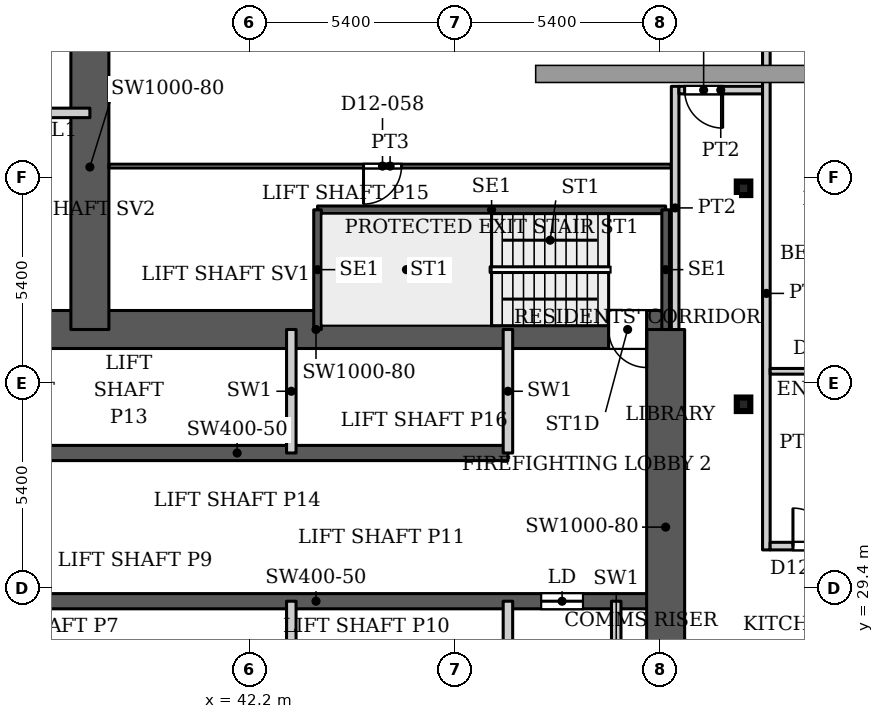
"""IFC4 building model, lengths in metres.
Left out: names, types, materials, properties, quantities, classifications, styles, units other than length and angle.
Written with IfcOpenShell. Run it as: python <this file> out.ifc"""

import sys

from ifc_helpers import new_model, si_unit, direction, frame, frame_2d, origin, origin_2d, place, context, subcontext, project, spatial, rectangle, hollow_rectangle, extrude, source, transform, mapped, element, fill, save


model = new_model("IFC4")
c1 = context("Model", 3, precision=1e-05, world=origin(), true_north=direction((0.0, 1.0)))
c2 = subcontext(c1, "Body", "Model", "MODEL_VIEW")
j1 = project(units=[si_unit("LENGTHUNIT", "METRE"), si_unit("PLANEANGLEUNIT", "RADIAN")], contexts=[c1])
p1 = place(None, origin())
s1 = spatial("IfcSite", under=j1, at=p1, CompositionType="ELEMENT")
p2 = place(p1, origin())
s2 = spatial("IfcBuilding", under=s1, at=p2, CompositionType="ELEMENT")
p3 = place(p2, frame((0.0, 0.0, 57.8)))
s3 = spatial("IfcBuildingStorey", under=s2, at=p3, CompositionType="ELEMENT", Elevation=57.8)
for number, where, z_axis, x_axis in (
    (1, (55.2, 34.232, 0.0), (0.0, 0.0, 1.0), (1.0, 0.0, 0.0)),
    (2, (55.2, 39.916, 0.0), (0.0, 0.0, 1.0), (1.0, 0.0, 0.0)),
):
    element("IfcColumn", number, at=place(p3, frame(where, z_axis=z_axis, x_axis=x_axis)), inside=s3, PredefinedType="COLUMN", context=c2, shape_type="SweptSolid", body=[
        extrude(hollow_rectangle(XDim=0.356, YDim=0.356, WallThickness=0.016, InnerFilletRadius=0.016, OuterFilletRadius=0.032, at=origin_2d()), origin(), (0.0, 0.0, 1.0), 3.9),
    ])
p4 = place(p3, frame((34.75, 29.05, 0.0), z_axis=(0.0, 0.0, 1.0), x_axis=(1.0, 0.0, 0.0)))
e3 = element("IfcWall", 3, at=p4, inside=s3, PredefinedType="SHEAR", context=c2, shape_type="SweptSolid", body=[
    extrude(rectangle(XDim=18.4, YDim=0.4, at=frame_2d((9.2, 0.0))), origin(), (0.0, 0.0, 1.0), 3.9),
])
p5 = place(p4, frame((15.125, 0.0, 0.0)))
e4 = element("IfcOpeningElement", 4, at=p5, cuts=e3, PredefinedType="OPENING", context=c2, shape_type="SweptSolid", body=[
    extrude(rectangle(XDim=1.1, YDim=2.2, at=frame_2d((0.55, 1.1))), frame((0.0, 0.21, 0.0), z_axis=(0.0, -1.0, 0.0), x_axis=(1.0, 0.0, 0.0)), (0.0, 0.0, 1.0), 0.42),
])
p6 = place(p3, frame((34.75, 32.95, 0.0), z_axis=(0.0, 0.0, 1.0), x_axis=(1.0, 0.0, 0.0)))
e5 = element("IfcWall", 5, at=p6, inside=s3, PredefinedType="SHEAR", context=c2, shape_type="SweptSolid", body=[
    extrude(rectangle(XDim=14.25, YDim=0.4, at=frame_2d((7.125, 0.0))), origin(), (0.0, 0.0, 1.0), 3.9),
])
p7 = place(p3, frame((34.75, 36.2, 0.0), z_axis=(0.0, 0.0, 1.0), x_axis=(1.0, 0.0, 0.0)))
e6 = element("IfcWall", 6, at=p7, inside=s3, PredefinedType="SHEAR", context=c2, shape_type="SweptSolid", body=[
    extrude(rectangle(XDim=18.4, YDim=1.0, at=frame_2d((9.2, 0.0))), origin(), (0.0, 0.0, 1.0), 3.9),
])
p8 = place(p7, frame((16.9, 0.0, 0.0)))
e7 = element("IfcOpeningElement", 7, at=p8, cuts=e6, PredefinedType="OPENING", context=c2, shape_type="SweptSolid", body=[
    extrude(rectangle(XDim=1.0, YDim=2.2, at=frame_2d((0.5, 1.1))), frame((0.0, 0.51, 0.0), z_axis=(0.0, -1.0, 0.0), x_axis=(1.0, 0.0, 0.0)), (0.0, 0.0, 1.0), 1.02),
])
p9 = place(p3, frame((38.0, 36.2, 0.0), z_axis=(0.0, 0.0, 1.0), x_axis=(0.0, 1.0, 0.0)))
e8 = element("IfcWall", 8, at=p9, inside=s3, PredefinedType="SHEAR", context=c2, shape_type="SweptSolid", body=[
    extrude(rectangle(XDim=8.55, YDim=1.0, at=frame_2d((4.275, 0.0))), origin(), (0.0, 0.0, 1.0), 3.9),
])
p10 = place(p3, frame((53.15, 25.8, 0.0), z_axis=(0.0, 0.0, 1.0), x_axis=(0.0, 1.0, 0.0)))
e9 = element("IfcWall", 9, at=p10, inside=s3, PredefinedType="SHEAR", context=c2, shape_type="SweptSolid", body=[
    extrude(rectangle(XDim=10.4, YDim=1.0, at=frame_2d((5.2, 0.0))), origin(), (0.0, 0.0, 1.0), 3.9),
])
p11 = place(p3, frame((43.99, 39.35, 0.0), z_axis=(0.0, 0.0, 1.0), x_axis=(1.0, 0.0, 0.0)))
e10 = element("IfcWall", 10, at=p11, inside=s3, PredefinedType="SHEAR", context=c2, shape_type="SweptSolid", body=[
    extrude(rectangle(XDim=9.16, YDim=0.2, at=frame_2d((4.58, 0.0))), origin(), (0.0, 0.0, 1.0), 3.9),
])
for number, where, z_axis, x_axis in (
    (11, (43.99, 36.2, 0.0), (0.0, 0.0, 1.0), (0.0, 1.0, 0.0)),
    (12, (53.15, 36.2, 0.0), (0.0, 0.0, 1.0), (0.0, 1.0, 0.0)),
):
    element("IfcWall", number, at=place(p3, frame(where, z_axis=z_axis, x_axis=x_axis)), inside=s3, PredefinedType="SHEAR", context=c2, shape_type="SweptSolid", body=[
        extrude(rectangle(XDim=3.15, YDim=0.2, at=frame_2d((1.575, 0.0))), origin(), (0.0, 0.0, 1.0), 3.9),
    ])
for number, where, z_axis, x_axis in (
    (13, (43.3, 25.8, 0.0), (0.0, 0.0, 1.0), (0.0, 1.0, 0.0)),
    (14, (43.3, 32.95, 0.0), (0.0, 0.0, 1.0), (0.0, 1.0, 0.0)),
    (15, (49.0, 25.8, 0.0), (0.0, 0.0, 1.0), (0.0, 1.0, 0.0)),
    (16, (49.0, 32.95, 0.0), (0.0, 0.0, 1.0), (0.0, 1.0, 0.0)),
    (17, (51.85, 25.8, 0.0), (0.0, 0.0, 1.0), (0.0, 1.0, 0.0)),
    (18, (34.75, 41.9, 0.0), (0.0, 0.0, 1.0), (1.0, 0.0, 0.0)),
):
    element("IfcWall", number, at=place(p3, frame(where, z_axis=z_axis, x_axis=x_axis)), inside=s3, PredefinedType="PARTITIONING", context=c2, shape_type="SweptSolid", body=[
        extrude(rectangle(XDim=3.25, YDim=0.25, at=frame_2d((1.625, 0.0))), origin(), (0.0, 0.0, 1.0), 3.9),
    ])
p12 = place(p3, frame((38.499, 40.5, 0.0), z_axis=(0.0, 0.0, 1.0), x_axis=(1.0, 0.0, 0.0)))
e19 = element("IfcWall", 19, at=p12, inside=s3, PredefinedType="PARTITIONING", context=c2, shape_type="SweptSolid", body=[
    extrude(rectangle(XDim=14.801, YDim=0.1, at=frame_2d((7.4, 0.0))), origin(), (0.0, 0.0, 1.0), 3.6),
])
p13 = place(p12, frame((6.701, 0.0, 0.0)))
e20 = element("IfcOpeningElement", 20, at=p13, cuts=e19, PredefinedType="OPENING", context=c2, shape_type="SweptSolid", body=[
    extrude(rectangle(XDim=1.0, YDim=2.1, at=frame_2d((0.5, 1.05))), frame((0.0, 0.06, 0.0), z_axis=(0.0, -1.0, 0.0), x_axis=(1.0, 0.0, 0.0)), (0.0, 0.0, 1.0), 0.12),
])
p14 = place(p3, frame((53.4, 36.199, 0.0), z_axis=(0.0, 0.0, 1.0), x_axis=(0.0, 1.0, 0.0)))
e21 = element("IfcWall", 21, at=p14, inside=s3, PredefinedType="PARTITIONING", context=c2, shape_type="SweptSolid", body=[
    extrude(rectangle(XDim=6.401, YDim=0.2, at=frame_2d((3.201, 0.0))), origin(), (0.0, 0.0, 1.0), 3.6),
])
p15 = place(p3, frame((53.5, 42.5, 0.0), z_axis=(0.0, 0.0, 1.0), x_axis=(1.0, 0.0, 0.0)))
e22 = element("IfcWall", 22, at=p15, inside=s3, PredefinedType="PARTITIONING", context=c2, shape_type="SweptSolid", body=[
    extrude(rectangle(XDim=2.2, YDim=0.2, at=frame_2d((1.1, 0.0))), origin(), (0.0, 0.0, 1.0), 3.6),
])
p16 = place(p15, frame((0.15, 0.0, 0.0)))
e23 = element("IfcOpeningElement", 23, at=p16, cuts=e22, PredefinedType="OPENING", context=c2, shape_type="SweptSolid", body=[
    extrude(rectangle(XDim=1.0, YDim=2.1, at=frame_2d((0.5, 1.05))), frame((0.0, 0.11, 0.0), z_axis=(0.0, -1.0, 0.0), x_axis=(1.0, 0.0, 0.0)), (0.0, 0.0, 1.0), 0.22),
])
p17 = place(p3, frame((55.8, 30.4, 0.0), z_axis=(0.0, 0.0, 1.0), x_axis=(0.0, 1.0, 0.0)))
e24 = element("IfcWall", 24, at=p17, inside=s3, PredefinedType="PARTITIONING", context=c2, shape_type="SweptSolid", body=[
    extrude(rectangle(XDim=13.5, YDim=0.2, at=frame_2d((6.75, 0.0))), origin(), (0.0, 0.0, 1.0), 3.6),
])
p18 = place(p3, frame((55.9, 30.5, 0.0), z_axis=(0.0, 0.0, 1.0), x_axis=(1.0, 0.0, 0.0)))
e25 = element("IfcWall", 25, at=p18, inside=s3, PredefinedType="PARTITIONING", context=c2, shape_type="SweptSolid", body=[
    extrude(rectangle(XDim=42.2, YDim=0.2, at=frame_2d((21.1, 0.0))), origin(), (0.0, 0.0, 1.0), 3.6),
])
p19 = place(p18, frame((0.6, 0.0, 0.0)))
e26 = element("IfcOpeningElement", 26, at=p19, cuts=e25, PredefinedType="OPENING", context=c2, shape_type="SweptSolid", body=[
    extrude(rectangle(XDim=1.0, YDim=2.1, at=frame_2d((0.5, 1.05))), frame((0.0, 0.11, 0.0), z_axis=(0.0, -1.0, 0.0), x_axis=(1.0, 0.0, 0.0)), (0.0, 0.0, 1.0), 0.22),
])
p20 = place(p18, frame((13.2, 0.0, 0.0)))
e27 = element("IfcOpeningElement", 27, at=p20, cuts=e25, PredefinedType="OPENING", context=c2, shape_type="SweptSolid", body=[
    extrude(rectangle(XDim=1.0, YDim=2.1, at=frame_2d((0.5, 1.05))), frame((0.0, 0.11, 0.0), z_axis=(0.0, -1.0, 0.0), x_axis=(1.0, 0.0, 0.0)), (0.0, 0.0, 1.0), 0.22),
])
p21 = place(p18, frame((22.8, 0.0, 0.0)))
e28 = element("IfcOpeningElement", 28, at=p21, cuts=e25, PredefinedType="OPENING", context=c2, shape_type="SweptSolid", body=[
    extrude(rectangle(XDim=1.0, YDim=2.1, at=frame_2d((0.5, 1.05))), frame((0.0, 0.11, 0.0), z_axis=(0.0, -1.0, 0.0), x_axis=(1.0, 0.0, 0.0)), (0.0, 0.0, 1.0), 0.22),
])
p22 = place(p18, frame((34.65, 0.0, 0.0)))
e29 = element("IfcOpeningElement", 29, at=p22, cuts=e25, PredefinedType="OPENING", context=c2, shape_type="SweptSolid", body=[
    extrude(rectangle(XDim=1.0, YDim=2.1, at=frame_2d((0.5, 1.05))), frame((0.0, 0.11, 0.0), z_axis=(0.0, -1.0, 0.0), x_axis=(1.0, 0.0, 0.0)), (0.0, 0.0, 1.0), 0.22),
])
p23 = place(p3, frame((55.9, 35.1, 0.0), z_axis=(0.0, 0.0, 1.0), x_axis=(1.0, 0.0, 0.0)))
e30 = element("IfcWall", 30, at=p23, inside=s3, PredefinedType="PARTITIONING", context=c2, shape_type="SweptSolid", body=[
    extrude(rectangle(XDim=12.7, YDim=0.15, at=frame_2d((6.35, 0.0))), origin(), (0.0, 0.0, 1.0), 3.6),
])
p24 = place(p23, frame((1.25, 0.0, 0.0)))
e31 = element("IfcOpeningElement", 31, at=p24, cuts=e30, PredefinedType="OPENING", context=c2, shape_type="SweptSolid", body=[
    extrude(rectangle(XDim=0.9, YDim=2.1, at=frame_2d((0.45, 1.05))), frame((0.0, 0.085, 0.0), z_axis=(0.0, -1.0, 0.0), x_axis=(1.0, 0.0, 0.0)), (0.0, 0.0, 1.0), 0.17),
])
p25 = place(p23, frame((9.75, 0.0, 0.0)))
e32 = element("IfcOpeningElement", 32, at=p25, cuts=e30, PredefinedType="OPENING", context=c2, shape_type="SweptSolid", body=[
    extrude(rectangle(XDim=1.0, YDim=2.1, at=frame_2d((0.5, 1.05))), frame((0.0, 0.085, 0.0), z_axis=(0.0, -1.0, 0.0), x_axis=(1.0, 0.0, 0.0)), (0.0, 0.0, 1.0), 0.17),
])
p26 = place(p23, frame((4.1, 0.0, 0.0)))
e33 = element("IfcOpeningElement", 33, at=p26, cuts=e30, PredefinedType="OPENING", context=c2, shape_type="SweptSolid", body=[
    extrude(rectangle(XDim=0.9, YDim=2.1, at=frame_2d((0.45, 1.05))), frame((0.0, 0.085, 0.0), z_axis=(0.0, -1.0, 0.0), x_axis=(1.0, 0.0, 0.0)), (0.0, 0.0, 1.0), 0.17),
])
m1 = source(origin(), c2, "Body", "SweptSolid", [
    extrude(rectangle(XDim=1.1, YDim=2.2, at=frame_2d((0.55, 1.1))), frame((0.0, 0.025, 0.0), z_axis=(0.0, -1.0, 0.0), x_axis=(1.0, 0.0, 0.0)), (0.0, 0.0, 1.0), 0.05),
])
p27 = place(p5, origin())
e34 = element("IfcDoor", 34, at=p27, inside=s3, OperationType="SLIDING_TO_LEFT", PredefinedType="DOOR", context=c2, shape_type="MappedRepresentation", body=[
    mapped(m1, transform((0.0, 0.0, 0.0), x_axis=(1.0, 0.0, 0.0), y_axis=(0.0, 1.0, 0.0), z_axis=(0.0, 0.0, 1.0), scale=1.0)),
])
fill(e4, e34)
m2 = source(origin(), c2, "Body", "SweptSolid", [
    extrude(rectangle(XDim=1.0, YDim=2.2, at=frame_2d((0.5, 1.1))), frame((0.0, 0.025, 0.0), z_axis=(0.0, -1.0, 0.0), x_axis=(1.0, 0.0, 0.0)), (0.0, 0.0, 1.0), 0.05),
])
p28 = place(p8, origin())
e35 = element("IfcDoor", 35, at=p28, inside=s3, OperationType="SINGLE_SWING_RIGHT", PredefinedType="DOOR", context=c2, shape_type="MappedRepresentation", body=[
    mapped(m2, transform((0.0, 0.0, 0.0), x_axis=(1.0, 0.0, 0.0), y_axis=(0.0, 1.0, 0.0), z_axis=(0.0, 0.0, 1.0), scale=1.0)),
])
fill(e7, e35)
m3 = source(origin(), c2, "Body", "SweptSolid", [
    extrude(rectangle(XDim=1.0, YDim=2.1, at=frame_2d((0.5, 1.05))), frame((0.0, 0.025, 0.0), z_axis=(0.0, -1.0, 0.0), x_axis=(1.0, 0.0, 0.0)), (0.0, 0.0, 1.0), 0.05),
])
p29 = place(p19, origin())
e36 = element("IfcDoor", 36, at=p29, inside=s3, OperationType="SINGLE_SWING_LEFT", PredefinedType="DOOR", context=c2, shape_type="MappedRepresentation", body=[
    mapped(m3, transform((0.0, 0.0, 0.0), x_axis=(1.0, 0.0, 0.0), y_axis=(0.0, 1.0, 0.0), z_axis=(0.0, 0.0, 1.0), scale=1.0)),
])
fill(e26, e36)
m4 = source(origin(), c2, "Body", "SweptSolid", [
    extrude(rectangle(XDim=1.0, YDim=2.1, at=frame_2d((0.5, 1.05))), frame((0.0, 0.025, 0.0), z_axis=(0.0, -1.0, 0.0), x_axis=(1.0, 0.0, 0.0)), (0.0, 0.0, 1.0), 0.05),
])
p30 = place(p13, origin())
e37 = element("IfcDoor", 37, at=p30, inside=s3, OperationType="SINGLE_SWING_RIGHT", PredefinedType="DOOR", context=c2, shape_type="MappedRepresentation", body=[
    mapped(m4, transform((0.0, 0.0, 0.0), x_axis=(1.0, 0.0, 0.0), y_axis=(0.0, 1.0, 0.0), z_axis=(0.0, 0.0, 1.0), scale=1.0)),
])
fill(e20, e37)
m5 = source(origin(), c2, "Body", "SweptSolid", [
    extrude(rectangle(XDim=1.0, YDim=2.1, at=frame_2d((0.5, 1.05))), frame((0.0, 0.025, 0.0), z_axis=(0.0, -1.0, 0.0), x_axis=(1.0, 0.0, 0.0)), (0.0, 0.0, 1.0), 0.05),
])
p31 = place(p16, origin())
e38 = element("IfcDoor", 38, at=p31, inside=s3, OperationType="SINGLE_SWING_RIGHT", PredefinedType="DOOR", context=c2, shape_type="MappedRepresentation", body=[
    mapped(m5, transform((0.0, 0.0, 0.0), x_axis=(1.0, 0.0, 0.0), y_axis=(0.0, 1.0, 0.0), z_axis=(0.0, 0.0, 1.0), scale=1.0)),
])
fill(e23, e38)
save(model, sys.argv[1])
